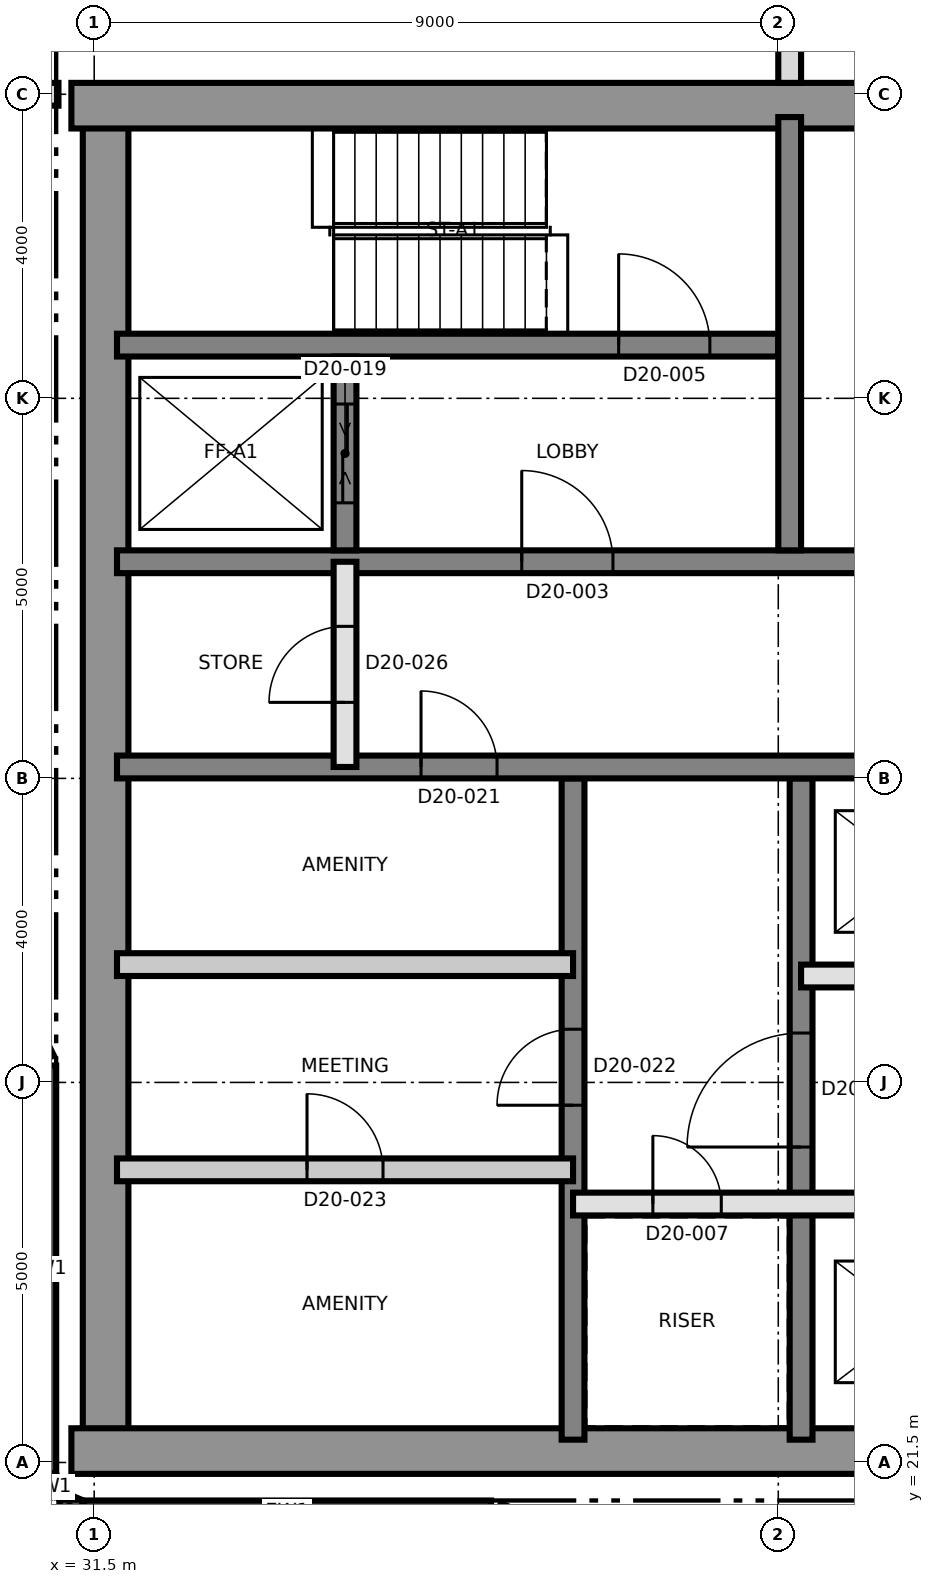
"""IFC4 building model, lengths in metres.
Left out: names, types, materials, properties, quantities, classifications, styles, units other than length and angle.
Written with IfcOpenShell. Run it as: python <this file> out.ifc"""

import sys

from ifc_helpers import new_model, si_unit, direction, frame, frame_2d, origin, place, context, subcontext, project, spatial, rectangle, extrude, element, fill, save


model = new_model("IFC4")
c1 = context("Model", 3, precision=1e-05, world=origin(), true_north=direction((0.0, 1.0)))
c2 = subcontext(c1, "Body", "Model", "MODEL_VIEW")
j1 = project(units=[si_unit("LENGTHUNIT", "METRE"), si_unit("PLANEANGLEUNIT", "RADIAN")], contexts=[c1])
p1 = place(None, origin())
s1 = spatial("IfcSite", under=j1, at=p1, CompositionType="ELEMENT")
p2 = place(p1, origin())
s2 = spatial("IfcBuilding", under=s1, at=p2, CompositionType="ELEMENT")
p3 = place(p2, frame((0.0, 0.0, 186.6)))
s3 = spatial("IfcBuildingStorey", under=s2, at=p3, CompositionType="ELEMENT", Elevation=186.6)
p4 = place(p3, frame((31.65, 21.8, 0.0), z_axis=(0.0, 0.0, 1.0), x_axis=(0.0, 1.0, 0.0)))
e1 = element("IfcWall", 1, at=p4, inside=s3, PredefinedType="SHEAR", context=c2, shape_type="SweptSolid", body=[
    extrude(rectangle(XDim=17.4, YDim=0.6, at=frame_2d((8.7, 0.0))), origin(), (0.0, 0.0, 1.0), 3.7),
])
p5 = place(p3, frame((31.2, 21.65, 0.0), z_axis=(0.0, 0.0, 1.0), x_axis=(1.0, 0.0, 0.0)))
e2 = element("IfcWall", 2, at=p5, inside=s3, PredefinedType="SHEAR", context=c2, shape_type="SweptSolid", body=[
    extrude(rectangle(XDim=27.0, YDim=0.6, at=frame_2d((13.5, 0.0))), origin(), (0.0, 0.0, 1.0), 3.7),
])
p6 = place(p3, frame((31.2, 39.35, 0.0), z_axis=(0.0, 0.0, 1.0), x_axis=(1.0, 0.0, 0.0)))
e3 = element("IfcWall", 3, at=p6, inside=s3, PredefinedType="SHEAR", context=c2, shape_type="SweptSolid", body=[
    extrude(rectangle(XDim=27.0, YDim=0.6, at=frame_2d((13.5, 0.0))), origin(), (0.0, 0.0, 1.0), 3.7),
])
p7 = place(p6, frame((10.5, 0.0, 0.0)))
e4 = element("IfcOpeningElement", 4, at=p7, cuts=e3, PredefinedType="OPENING", context=c2, shape_type="SweptSolid", body=[
    extrude(rectangle(XDim=1.2, YDim=2.1, at=frame_2d((0.6, 1.05))), frame((0.0, 0.31, 0.0), z_axis=(0.0, -1.0, 0.0), x_axis=(1.0, 0.0, 0.0)), (0.0, 0.0, 1.0), 0.62),
])
p8 = place(p3, frame((37.8, 21.8, 0.0), z_axis=(0.0, 0.0, 1.0), x_axis=(0.0, 1.0, 0.0)))
e5 = element("IfcWall", 5, at=p8, inside=s3, PredefinedType="SHEAR", context=c2, shape_type="SweptSolid", body=[
    extrude(rectangle(XDim=8.7, YDim=0.3, at=frame_2d((4.35, 0.0))), origin(), (0.0, 0.0, 1.0), 3.7),
])
p9 = place(p8, frame((4.4, 0.0, 0.0)))
e6 = element("IfcOpeningElement", 6, at=p9, cuts=e5, PredefinedType="OPENING", context=c2, shape_type="SweptSolid", body=[
    extrude(rectangle(XDim=1.0, YDim=2.1, at=frame_2d((0.5, 1.05))), frame((0.0, 0.16, 0.0), z_axis=(0.0, -1.0, 0.0), x_axis=(1.0, 0.0, 0.0)), (0.0, 0.0, 1.0), 0.32),
])
p10 = place(p3, frame((40.8, 21.8, 0.0), z_axis=(0.0, 0.0, 1.0), x_axis=(0.0, 1.0, 0.0)))
e7 = element("IfcWall", 7, at=p10, inside=s3, PredefinedType="SHEAR", context=c2, shape_type="SweptSolid", body=[
    extrude(rectangle(XDim=8.7, YDim=0.3, at=frame_2d((4.35, 0.0))), origin(), (0.0, 0.0, 1.0), 3.7),
])
p11 = place(p10, frame((3.85, 0.0, 0.0)))
e8 = element("IfcOpeningElement", 8, at=p11, cuts=e7, PredefinedType="OPENING", context=c2, shape_type="SweptSolid", body=[
    extrude(rectangle(XDim=1.5, YDim=2.1, at=frame_2d((0.75, 1.05))), frame((0.0, 0.16, 0.0), z_axis=(0.0, -1.0, 0.0), x_axis=(1.0, 0.0, 0.0)), (0.0, 0.0, 1.0), 0.32),
])
p12 = place(p3, frame((31.8, 30.65, 0.0), z_axis=(0.0, 0.0, 1.0), x_axis=(1.0, 0.0, 0.0)))
e9 = element("IfcWall", 9, at=p12, inside=s3, PredefinedType="SHEAR", context=c2, shape_type="SweptSolid", body=[
    extrude(rectangle(XDim=26.4, YDim=0.3, at=frame_2d((13.2, 0.0))), origin(), (0.0, 0.0, 1.0), 3.7),
])
p13 = place(p12, frame((24.7, 0.0, 0.0)))
e10 = element("IfcOpeningElement", 10, at=p13, cuts=e9, PredefinedType="OPENING", context=c2, shape_type="SweptSolid", body=[
    extrude(rectangle(XDim=1.0, YDim=2.1, at=frame_2d((0.5, 1.05))), frame((0.0, 0.16, 0.0), z_axis=(0.0, -1.0, 0.0), x_axis=(1.0, 0.0, 0.0)), (0.0, 0.0, 1.0), 0.32),
])
p14 = place(p12, frame((4.0, 0.0, 0.0)))
e11 = element("IfcOpeningElement", 11, at=p14, cuts=e9, PredefinedType="OPENING", context=c2, shape_type="SweptSolid", body=[
    extrude(rectangle(XDim=1.0, YDim=2.1, at=frame_2d((0.5, 1.05))), frame((0.0, 0.16, 0.0), z_axis=(0.0, -1.0, 0.0), x_axis=(1.0, 0.0, 0.0)), (0.0, 0.0, 1.0), 0.32),
])
p15 = place(p3, frame((31.8, 33.35, 0.0), z_axis=(0.0, 0.0, 1.0), x_axis=(1.0, 0.0, 0.0)))
e12 = element("IfcWall", 12, at=p15, inside=s3, PredefinedType="SHEAR", context=c2, shape_type="SweptSolid", body=[
    extrude(rectangle(XDim=26.4, YDim=0.3, at=frame_2d((13.2, 0.0))), origin(), (0.0, 0.0, 1.0), 3.7),
])
p16 = place(p15, frame((13.85, 0.0, 0.0)))
e13 = element("IfcOpeningElement", 13, at=p16, cuts=e12, PredefinedType="OPENING", context=c2, shape_type="SweptSolid", body=[
    extrude(rectangle(XDim=1.4, YDim=2.1, at=frame_2d((0.7, 1.05))), frame((0.0, 0.16, 0.0), z_axis=(0.0, -1.0, 0.0), x_axis=(1.0, 0.0, 0.0)), (0.0, 0.0, 1.0), 0.32),
])
p17 = place(p15, frame((5.325, 0.0, 0.0)))
e14 = element("IfcOpeningElement", 14, at=p17, cuts=e12, PredefinedType="OPENING", context=c2, shape_type="SweptSolid", body=[
    extrude(rectangle(XDim=1.2, YDim=2.1, at=frame_2d((0.6, 1.05))), frame((0.0, 0.16, 0.0), z_axis=(0.0, -1.0, 0.0), x_axis=(1.0, 0.0, 0.0)), (0.0, 0.0, 1.0), 0.32),
])
p18 = place(p15, frame((19.875, 0.0, 0.0)))
e15 = element("IfcOpeningElement", 15, at=p18, cuts=e12, PredefinedType="OPENING", context=c2, shape_type="SweptSolid", body=[
    extrude(rectangle(XDim=1.2, YDim=2.1, at=frame_2d((0.6, 1.05))), frame((0.0, 0.16, 0.0), z_axis=(0.0, -1.0, 0.0), x_axis=(1.0, 0.0, 0.0)), (0.0, 0.0, 1.0), 0.32),
])
p19 = place(p3, frame((31.8, 36.2, 0.0), z_axis=(0.0, 0.0, 1.0), x_axis=(1.0, 0.0, 0.0)))
e16 = element("IfcWall", 16, at=p19, inside=s3, PredefinedType="SHEAR", context=c2, shape_type="SweptSolid", body=[
    extrude(rectangle(XDim=8.7, YDim=0.3, at=frame_2d((4.35, 0.0))), origin(), (0.0, 0.0, 1.0), 3.7),
])
p20 = place(p19, frame((6.6, 0.0, 0.0)))
e17 = element("IfcOpeningElement", 17, at=p20, cuts=e16, PredefinedType="OPENING", context=c2, shape_type="SweptSolid", body=[
    extrude(rectangle(XDim=1.2, YDim=2.1, at=frame_2d((0.6, 1.05))), frame((0.0, 0.16, 0.0), z_axis=(0.0, -1.0, 0.0), x_axis=(1.0, 0.0, 0.0)), (0.0, 0.0, 1.0), 0.32),
])
p21 = place(p3, frame((40.65, 33.5, 0.0), z_axis=(0.0, 0.0, 1.0), x_axis=(0.0, 1.0, 0.0)))
e18 = element("IfcWall", 18, at=p21, inside=s3, PredefinedType="SHEAR", context=c2, shape_type="SweptSolid", body=[
    extrude(rectangle(XDim=5.7, YDim=0.3, at=frame_2d((2.85, 0.0))), origin(), (0.0, 0.0, 1.0), 3.7),
])
p22 = place(p3, frame((34.8, 33.5, 0.0), z_axis=(0.0, 0.0, 1.0), x_axis=(0.0, 1.0, 0.0)))
e19 = element("IfcWall", 19, at=p22, inside=s3, PredefinedType="SHEAR", context=c2, shape_type="SweptSolid", body=[
    extrude(rectangle(XDim=2.55, YDim=0.3, at=frame_2d((1.275, 0.0))), origin(), (0.0, 0.0, 1.0), 3.7),
])
p23 = place(p22, frame((0.625, 0.0, 0.0)))
e20 = element("IfcOpeningElement", 20, at=p23, cuts=e19, PredefinedType="OPENING", context=c2, shape_type="SweptSolid", body=[
    extrude(rectangle(XDim=1.3, YDim=2.4, at=frame_2d((0.65, 1.2))), frame((0.0, 0.16, 0.0), z_axis=(0.0, -1.0, 0.0), x_axis=(1.0, 0.0, 0.0)), (0.0, 0.0, 1.0), 0.32),
])
p24 = place(p3, frame((30.85, 26.722, 0.0), z_axis=(0.0, 0.0, 1.0), x_axis=(0.0, -1.0, 0.0)))
e21 = element("IfcWall", 21, at=p24, inside=s3, PredefinedType="SOLIDWALL", context=c2, shape_type="SweptSolid", body=[
    extrude(rectangle(XDim=5.362, YDim=0.3, at=frame_2d((2.681, 0.0))), origin(), (0.0, 0.0, 1.0), 3.4),
])
for number, where, z_axis, x_axis in (
    (22, (30.861, 21.302, 0.0), (0.0, 0.0, 1.0), (0.383, -0.924, 0.0)),
    (23, (31.048, 20.967, 0.0), (0.0, 0.0, 1.0), (0.924, -0.383, 0.0)),
):
    element("IfcWall", number, at=place(p3, frame(where, z_axis=z_axis, x_axis=x_axis)), inside=s3, PredefinedType="SOLIDWALL", context=c2, shape_type="SweptSolid", body=[
        extrude(rectangle(XDim=0.275, YDim=0.3, at=frame_2d((0.138, 0.0))), origin(), (0.0, 0.0, 1.0), 3.4),
    ])
p25 = place(p3, frame((31.36, 20.85, 0.0), z_axis=(0.0, 0.0, 1.0), x_axis=(1.0, 0.0, 0.0)))
e24 = element("IfcWall", 24, at=p25, inside=s3, PredefinedType="SOLIDWALL", context=c2, shape_type="SweptSolid", body=[
    extrude(rectangle(XDim=5.362, YDim=0.3, at=frame_2d((2.681, 0.0))), origin(), (0.0, 0.0, 1.0), 3.4),
])
for number, where, z_axis, x_axis in (
    (25, (36.788, 20.834, 0.0), (0.0, 0.0, 1.0), (0.897, -0.442, 0.0)),
    (26, (30.119, 28.24, 0.0), (0.0, 0.0, 1.0), (0.442, -0.897, 0.0)),
):
    element("IfcWall", number, at=place(p3, frame(where, z_axis=z_axis, x_axis=x_axis)), inside=s3, PredefinedType="SOLIDWALL", context=c2, shape_type="SweptSolid", body=[
        extrude(rectangle(XDim=1.618, YDim=0.3, at=frame_2d((0.809, 0.0))), origin(), (0.0, 0.0, 1.0), 3.4),
    ])
p26 = place(p3, frame((37.8, 24.9, 0.0), z_axis=(0.0, 0.0, 1.0), x_axis=(1.0, 0.0, 0.0)))
e27 = element("IfcWall", 27, at=p26, inside=s3, PredefinedType="SOLIDWALL", context=c2, shape_type="SweptSolid", body=[
    extrude(rectangle(XDim=12.0, YDim=0.3, at=frame_2d((6.0, 0.0))), origin(), (0.0, 0.0, 1.0), 3.4),
])
p27 = place(p26, frame((1.05, 0.0, 0.0)))
e28 = element("IfcOpeningElement", 28, at=p27, cuts=e27, PredefinedType="OPENING", context=c2, shape_type="SweptSolid", body=[
    extrude(rectangle(XDim=0.9, YDim=2.1, at=frame_2d((0.45, 1.05))), frame((0.0, 0.16, 0.0), z_axis=(0.0, -1.0, 0.0), x_axis=(1.0, 0.0, 0.0)), (0.0, 0.0, 1.0), 0.32),
])
p28 = place(p26, frame((10.05, 0.0, 0.0)))
e29 = element("IfcOpeningElement", 29, at=p28, cuts=e27, PredefinedType="OPENING", context=c2, shape_type="SweptSolid", body=[
    extrude(rectangle(XDim=0.9, YDim=2.1, at=frame_2d((0.45, 1.05))), frame((0.0, 0.16, 0.0), z_axis=(0.0, -1.0, 0.0), x_axis=(1.0, 0.0, 0.0)), (0.0, 0.0, 1.0), 0.32),
])
p29 = place(p26, frame((3.95, 0.0, 0.0)))
e30 = element("IfcOpeningElement", 30, at=p29, cuts=e27, PredefinedType="OPENING", context=c2, shape_type="SweptSolid", body=[
    extrude(rectangle(XDim=1.1, YDim=2.4, at=frame_2d((0.55, 1.2))), frame((0.0, 0.16, 0.0), z_axis=(0.0, -1.0, 0.0), x_axis=(1.0, 0.0, 0.0)), (0.0, 0.0, 1.0), 0.32),
])
p30 = place(p26, frame((6.95, 0.0, 0.0)))
e31 = element("IfcOpeningElement", 31, at=p30, cuts=e27, PredefinedType="OPENING", context=c2, shape_type="SweptSolid", body=[
    extrude(rectangle(XDim=1.1, YDim=2.4, at=frame_2d((0.55, 1.2))), frame((0.0, 0.16, 0.0), z_axis=(0.0, -1.0, 0.0), x_axis=(1.0, 0.0, 0.0)), (0.0, 0.0, 1.0), 0.32),
])
p31 = place(p3, frame((31.8, 25.35, 0.0), z_axis=(0.0, 0.0, 1.0), x_axis=(1.0, 0.0, 0.0)))
e32 = element("IfcWall", 32, at=p31, inside=s3, PredefinedType="PARTITIONING", context=c2, shape_type="SweptSolid", body=[
    extrude(rectangle(XDim=6.0, YDim=0.3, at=frame_2d((3.0, 0.0))), origin(), (0.0, 0.0, 1.0), 3.4),
])
p32 = place(p31, frame((2.5, 0.0, 0.0)))
e33 = element("IfcOpeningElement", 33, at=p32, cuts=e32, PredefinedType="OPENING", context=c2, shape_type="SweptSolid", body=[
    extrude(rectangle(XDim=1.0, YDim=2.1, at=frame_2d((0.5, 1.05))), frame((0.0, 0.16, 0.0), z_axis=(0.0, -1.0, 0.0), x_axis=(1.0, 0.0, 0.0)), (0.0, 0.0, 1.0), 0.32),
])
p33 = place(p3, frame((40.8, 27.9, 0.0), z_axis=(0.0, 0.0, 1.0), x_axis=(1.0, 0.0, 0.0)))
e34 = element("IfcWall", 34, at=p33, inside=s3, PredefinedType="SOLIDWALL", context=c2, shape_type="SweptSolid", body=[
    extrude(rectangle(XDim=6.0, YDim=0.3, at=frame_2d((3.0, 0.0))), origin(), (0.0, 0.0, 1.0), 3.4),
])
p34 = place(p33, frame((0.95, 0.0, 0.0)))
e35 = element("IfcOpeningElement", 35, at=p34, cuts=e34, PredefinedType="OPENING", context=c2, shape_type="SweptSolid", body=[
    extrude(rectangle(XDim=1.1, YDim=2.4, at=frame_2d((0.55, 1.2))), frame((0.0, 0.16, 0.0), z_axis=(0.0, -1.0, 0.0), x_axis=(1.0, 0.0, 0.0)), (0.0, 0.0, 1.0), 0.32),
])
p35 = place(p33, frame((3.95, 0.0, 0.0)))
e36 = element("IfcOpeningElement", 36, at=p35, cuts=e34, PredefinedType="OPENING", context=c2, shape_type="SweptSolid", body=[
    extrude(rectangle(XDim=1.1, YDim=2.4, at=frame_2d((0.55, 1.2))), frame((0.0, 0.16, 0.0), z_axis=(0.0, -1.0, 0.0), x_axis=(1.0, 0.0, 0.0)), (0.0, 0.0, 1.0), 0.32),
])
p36 = place(p3, frame((31.8, 28.05, 0.0), z_axis=(0.0, 0.0, 1.0), x_axis=(1.0, 0.0, 0.0)))
e37 = element("IfcWall", 37, at=p36, inside=s3, PredefinedType="PARTITIONING", context=c2, shape_type="SweptSolid", body=[
    extrude(rectangle(XDim=6.0, YDim=0.3, at=frame_2d((3.0, 0.0))), origin(), (0.0, 0.0, 1.0), 3.4),
])
p37 = place(p3, frame((34.8, 30.65, 0.0), z_axis=(0.0, 0.0, 1.0), x_axis=(0.0, 1.0, 0.0)))
e38 = element("IfcWall", 38, at=p37, inside=s3, PredefinedType="SOLIDWALL", context=c2, shape_type="SweptSolid", body=[
    extrude(rectangle(XDim=2.7, YDim=0.3, at=frame_2d((1.35, 0.0))), origin(), (0.0, 0.0, 1.0), 3.4),
])
p38 = place(p37, frame((0.85, 0.0, 0.0)))
e39 = element("IfcOpeningElement", 39, at=p38, cuts=e38, PredefinedType="OPENING", context=c2, shape_type="SweptSolid", body=[
    extrude(rectangle(XDim=1.0, YDim=2.1, at=frame_2d((0.5, 1.05))), frame((0.0, 0.16, 0.0), z_axis=(0.0, -1.0, 0.0), x_axis=(1.0, 0.0, 0.0)), (0.0, 0.0, 1.0), 0.32),
])
p39 = place(p3, frame((29.17, 39.5, 0.0), z_axis=(0.0, 0.0, 1.0), x_axis=(1.0, 0.0, 0.0)))
e40 = element("IfcWall", 40, at=p39, inside=s3, PredefinedType="PARTITIONING", context=c2, shape_type="SweptSolid", body=[
    extrude(rectangle(XDim=1.86, YDim=0.3, at=frame_2d((0.93, 0.0))), origin(), (0.0, 0.0, 1.0), 3.35),
])
p40 = place(p3, frame((40.65, 39.65, 0.0), z_axis=(0.0, 0.0, 1.0), x_axis=(0.0, 1.0, 0.0)))
e41 = element("IfcWall", 41, at=p40, inside=s3, PredefinedType="PARTITIONING", context=c2, shape_type="SweptSolid", body=[
    extrude(rectangle(XDim=37.35, YDim=0.3, at=frame_2d((18.675, 0.0))), origin(), (0.0, 0.0, 1.0), 3.35),
])
p41 = place(p40, frame((1.0, 0.0, 0.0)))
e42 = element("IfcOpeningElement", 42, at=p41, cuts=e41, PredefinedType="OPENING", context=c2, shape_type="SweptSolid", body=[
    extrude(rectangle(XDim=1.0, YDim=2.1, at=frame_2d((0.5, 1.05))), frame((0.0, 0.16, 0.0), z_axis=(0.0, -1.0, 0.0), x_axis=(1.0, 0.0, 0.0)), (0.0, 0.0, 1.0), 0.32),
])
p42 = place(p40, frame((6.85, 0.0, 0.0)))
e43 = element("IfcOpeningElement", 43, at=p42, cuts=e41, PredefinedType="OPENING", context=c2, shape_type="SweptSolid", body=[
    extrude(rectangle(XDim=1.0, YDim=2.1, at=frame_2d((0.5, 1.05))), frame((0.0, 0.16, 0.0), z_axis=(0.0, -1.0, 0.0), x_axis=(1.0, 0.0, 0.0)), (0.0, 0.0, 1.0), 0.32),
])
p43 = place(p40, frame((10.0, 0.0, 0.0)))
e44 = element("IfcOpeningElement", 44, at=p43, cuts=e41, PredefinedType="OPENING", context=c2, shape_type="SweptSolid", body=[
    extrude(rectangle(XDim=1.0, YDim=2.1, at=frame_2d((0.5, 1.05))), frame((0.0, 0.16, 0.0), z_axis=(0.0, -1.0, 0.0), x_axis=(1.0, 0.0, 0.0)), (0.0, 0.0, 1.0), 0.32),
])
p44 = place(p40, frame((15.85, 0.0, 0.0)))
e45 = element("IfcOpeningElement", 45, at=p44, cuts=e41, PredefinedType="OPENING", context=c2, shape_type="SweptSolid", body=[
    extrude(rectangle(XDim=1.0, YDim=2.1, at=frame_2d((0.5, 1.05))), frame((0.0, 0.16, 0.0), z_axis=(0.0, -1.0, 0.0), x_axis=(1.0, 0.0, 0.0)), (0.0, 0.0, 1.0), 0.32),
])
p45 = place(p40, frame((21.35, 0.0, 0.0)))
e46 = element("IfcOpeningElement", 46, at=p45, cuts=e41, PredefinedType="OPENING", context=c2, shape_type="SweptSolid", body=[
    extrude(rectangle(XDim=1.0, YDim=2.1, at=frame_2d((0.5, 1.05))), frame((0.0, 0.16, 0.0), z_axis=(0.0, -1.0, 0.0), x_axis=(1.0, 0.0, 0.0)), (0.0, 0.0, 1.0), 0.32),
])
p46 = place(p11, origin())
e47 = element("IfcDoor", 47, at=p46, inside=s3, OperationType="SINGLE_SWING_RIGHT", PredefinedType="DOOR", context=c2, shape_type="SweptSolid", body=[
    extrude(rectangle(XDim=1.5, YDim=2.1, at=frame_2d((0.75, 1.05))), frame((0.0, 0.025, 0.0), z_axis=(0.0, -1.0, 0.0), x_axis=(1.0, 0.0, 0.0)), (0.0, 0.0, 1.0), 0.05),
])
fill(e8, e47)
p47 = place(p17, origin())
e48 = element("IfcDoor", 48, at=p47, inside=s3, OperationType="SINGLE_SWING_LEFT", PredefinedType="DOOR", context=c2, shape_type="SweptSolid", body=[
    extrude(rectangle(XDim=1.2, YDim=2.1, at=frame_2d((0.6, 1.05))), frame((0.0, 0.025, 0.0), z_axis=(0.0, -1.0, 0.0), x_axis=(1.0, 0.0, 0.0)), (0.0, 0.0, 1.0), 0.05),
])
fill(e14, e48)
p48 = place(p20, origin())
e49 = element("IfcDoor", 49, at=p48, inside=s3, OperationType="SINGLE_SWING_RIGHT", PredefinedType="DOOR", context=c2, shape_type="SweptSolid", body=[
    extrude(rectangle(XDim=1.2, YDim=2.1, at=frame_2d((0.6, 1.05))), frame((0.0, 0.025, 0.0), z_axis=(0.0, -1.0, 0.0), x_axis=(1.0, 0.0, 0.0)), (0.0, 0.0, 1.0), 0.05),
])
fill(e17, e49)
p49 = place(p27, origin())
e50 = element("IfcDoor", 50, at=p49, inside=s3, OperationType="SINGLE_SWING_LEFT", PredefinedType="DOOR", context=c2, shape_type="SweptSolid", body=[
    extrude(rectangle(XDim=0.9, YDim=2.1, at=frame_2d((0.45, 1.05))), frame((0.0, 0.025, 0.0), z_axis=(0.0, -1.0, 0.0), x_axis=(1.0, 0.0, 0.0)), (0.0, 0.0, 1.0), 0.05),
])
fill(e28, e50)
p50 = place(p23, origin())
e51 = element("IfcDoor", 51, at=p50, inside=s3, OperationType="SLIDING_TO_LEFT", PredefinedType="DOOR", context=c2, shape_type="SweptSolid", body=[
    extrude(rectangle(XDim=1.3, YDim=2.4, at=frame_2d((0.65, 1.2))), frame((0.0, 0.025, 0.0), z_axis=(0.0, -1.0, 0.0), x_axis=(1.0, 0.0, 0.0)), (0.0, 0.0, 1.0), 0.05),
])
fill(e20, e51)
p51 = place(p14, origin())
e52 = element("IfcDoor", 52, at=p51, inside=s3, OperationType="SINGLE_SWING_LEFT", PredefinedType="DOOR", context=c2, shape_type="SweptSolid", body=[
    extrude(rectangle(XDim=1.0, YDim=2.1, at=frame_2d((0.5, 1.05))), frame((0.0, 0.025, 0.0), z_axis=(0.0, -1.0, 0.0), x_axis=(1.0, 0.0, 0.0)), (0.0, 0.0, 1.0), 0.05),
])
fill(e11, e52)
p52 = place(p9, origin())
e53 = element("IfcDoor", 53, at=p52, inside=s3, OperationType="SINGLE_SWING_RIGHT", PredefinedType="DOOR", context=c2, shape_type="SweptSolid", body=[
    extrude(rectangle(XDim=1.0, YDim=2.1, at=frame_2d((0.5, 1.05))), frame((0.0, 0.025, 0.0), z_axis=(0.0, -1.0, 0.0), x_axis=(1.0, 0.0, 0.0)), (0.0, 0.0, 1.0), 0.05),
])
fill(e6, e53)
p53 = place(p32, origin())
e54 = element("IfcDoor", 54, at=p53, inside=s3, OperationType="SINGLE_SWING_RIGHT", PredefinedType="DOOR", context=c2, shape_type="SweptSolid", body=[
    extrude(rectangle(XDim=1.0, YDim=2.1, at=frame_2d((0.5, 1.05))), frame((0.0, 0.025, 0.0), z_axis=(0.0, -1.0, 0.0), x_axis=(1.0, 0.0, 0.0)), (0.0, 0.0, 1.0), 0.05),
])
fill(e33, e54)
p54 = place(p38, origin())
e55 = element("IfcDoor", 55, at=p54, inside=s3, OperationType="SINGLE_SWING_RIGHT", PredefinedType="DOOR", context=c2, shape_type="SweptSolid", body=[
    extrude(rectangle(XDim=1.0, YDim=2.1, at=frame_2d((0.5, 1.05))), frame((0.0, 0.025, 0.0), z_axis=(0.0, -1.0, 0.0), x_axis=(1.0, 0.0, 0.0)), (0.0, 0.0, 1.0), 0.05),
])
fill(e39, e55)
save(model, sys.argv[1])
